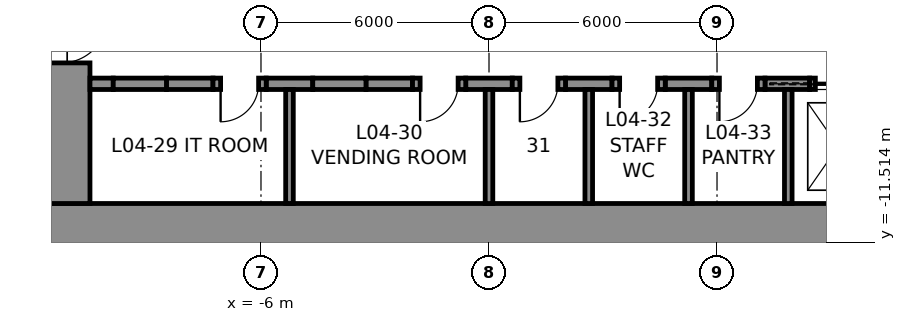
"""IFC4 building model, lengths in metres.
Left out: names, types, materials, properties, quantities, classifications, styles, units other than length and angle.
Written with IfcOpenShell. Run it as: python <this file> out.ifc"""

import sys

from ifc_helpers import new_model, si_unit, direction, frame, frame_2d, origin, place, context, subcontext, project, spatial, rectangle, extrude, element, fill, save


model = new_model("IFC4")
c1 = context("Model", 3, precision=1e-05, world=origin(), true_north=direction((0.0, 1.0)))
c2 = subcontext(c1, "Body", "Model", "MODEL_VIEW")
j1 = project(units=[si_unit("LENGTHUNIT", "METRE"), si_unit("PLANEANGLEUNIT", "RADIAN")], contexts=[c1])
p1 = place(None, origin())
s1 = spatial("IfcSite", under=j1, at=p1, CompositionType="ELEMENT")
p2 = place(p1, origin())
s2 = spatial("IfcBuilding", under=s1, at=p2, CompositionType="ELEMENT")
p3 = place(p2, frame((0.0, 0.0, 21.0)))
s3 = spatial("IfcBuildingStorey", under=s2, at=p3, CompositionType="ELEMENT", Elevation=21.0)
p4 = place(p3, frame((12.0, -11.25, 0.0), z_axis=(0.0, 0.0, 1.0), x_axis=(-1.0, 0.0, 0.0)))
e1 = element("IfcWall", 1, at=p4, inside=s3, PredefinedType="SHEAR", context=c2, shape_type="SweptSolid", body=[
    extrude(rectangle(XDim=24.0, YDim=1.5, at=frame_2d((12.0, 0.0))), origin(), (0.0, 0.0, 1.0), 5.5),
])
p5 = place(p3, frame((-11.25, -10.5, 0.0), z_axis=(0.0, 0.0, 1.0), x_axis=(0.0, 1.0, 0.0)))
e2 = element("IfcWall", 2, at=p5, inside=s3, PredefinedType="SHEAR", context=c2, shape_type="SweptSolid", body=[
    extrude(rectangle(XDim=21.0, YDim=1.5, at=frame_2d((10.5, 0.0))), origin(), (0.0, 0.0, 1.0), 5.5),
])
p6 = place(p5, frame((16.1, 0.0, 0.0)))
e3 = element("IfcOpeningElement", 3, at=p6, cuts=e2, PredefinedType="OPENING", context=c2, shape_type="SweptSolid", body=[
    extrude(rectangle(XDim=1.2, YDim=2.3, at=frame_2d((0.6, 1.15))), frame((0.0, 0.76, 0.0), z_axis=(0.0, -1.0, 0.0), x_axis=(1.0, 0.0, 0.0)), (0.0, 0.0, 1.0), 1.52),
])
p7 = place(p5, frame((3.7, 0.0, 0.0)))
e4 = element("IfcOpeningElement", 4, at=p7, cuts=e2, PredefinedType="OPENING", context=c2, shape_type="SweptSolid", body=[
    extrude(rectangle(XDim=1.2, YDim=2.3, at=frame_2d((0.6, 1.15))), frame((0.0, 0.76, 0.0), z_axis=(0.0, -1.0, 0.0), x_axis=(1.0, 0.0, 0.0)), (0.0, 0.0, 1.0), 1.52),
])
p8 = place(p3, frame((-10.5, -7.35, 0.0), z_axis=(0.0, 0.0, 1.0), x_axis=(1.0, 0.0, 0.0)))
e5 = element("IfcWall", 5, at=p8, inside=s3, PredefinedType="SHEAR", context=c2, shape_type="SweptSolid", body=[
    extrude(rectangle(XDim=0.613, YDim=0.3, at=frame_2d((0.306, 0.0))), origin(), (0.0, 0.0, 1.0), 5.5),
])
for number, where, z_axis, x_axis in (
    (6, (-8.488, -7.35, 0.0), (0.0, 0.0, 1.0), (1.0, 0.0, 0.0)),
    (7, (-5.863, -7.35, 0.0), (0.0, 0.0, 1.0), (1.0, 0.0, 0.0)),
    (8, (-3.238, -7.35, 0.0), (0.0, 0.0, 1.0), (1.0, 0.0, 0.0)),
    (9, (-0.613, -7.35, 0.0), (0.0, 0.0, 1.0), (1.0, 0.0, 0.0)),
    (10, (2.012, -7.35, 0.0), (0.0, 0.0, 1.0), (1.0, 0.0, 0.0)),
    (11, (4.637, -7.35, 0.0), (0.0, 0.0, 1.0), (1.0, 0.0, 0.0)),
):
    element("IfcWall", number, at=place(p3, frame(where, z_axis=z_axis, x_axis=x_axis)), inside=s3, PredefinedType="SHEAR", context=c2, shape_type="SweptSolid", body=[
        extrude(rectangle(XDim=1.225, YDim=0.3, at=frame_2d((0.613, 0.0))), origin(), (0.0, 0.0, 1.0), 5.5),
    ])
p9 = place(p3, frame((7.262, -7.35, 0.0), z_axis=(0.0, 0.0, 1.0), x_axis=(1.0, 0.0, 0.0)))
e12 = element("IfcWall", 12, at=p9, inside=s3, PredefinedType="SHEAR", context=c2, shape_type="SweptSolid", body=[
    extrude(rectangle(XDim=1.175, YDim=0.3, at=frame_2d((0.587, 0.0))), origin(), (0.0, 0.0, 1.0), 5.5),
])
p10 = place(p3, frame((-9.887, -7.35, 0.0), z_axis=(0.0, 0.0, 1.0), x_axis=(1.0, 0.0, 0.0)))
e13 = element("IfcWall", 13, at=p10, inside=s3, PredefinedType="PARTITIONING", context=c2, shape_type="SweptSolid", body=[
    extrude(rectangle(XDim=1.4, YDim=0.3, at=frame_2d((0.7, 0.0))), origin(), (0.0, 0.0, 1.0), 5.5),
])
p11 = place(p3, frame((-7.262, -7.35, 0.0), z_axis=(0.0, 0.0, 1.0), x_axis=(1.0, 0.0, 0.0)))
e14 = element("IfcWall", 14, at=p11, inside=s3, PredefinedType="PARTITIONING", context=c2, shape_type="SweptSolid", body=[
    extrude(rectangle(XDim=1.4, YDim=0.3, at=frame_2d((0.7, 0.0))), origin(), (0.0, 0.0, 1.0), 5.5),
])
p12 = place(p11, frame((0.2, 0.0, 0.0)))
e15 = element("IfcOpeningElement", 15, at=p12, cuts=e14, PredefinedType="OPENING", context=c2, shape_type="SweptSolid", body=[
    extrude(rectangle(XDim=1.0, YDim=2.3, at=frame_2d((0.5, 1.15))), frame((0.0, 0.16, 0.0), z_axis=(0.0, -1.0, 0.0), x_axis=(1.0, 0.0, 0.0)), (0.0, 0.0, 1.0), 0.32),
])
p13 = place(p3, frame((-4.637, -7.35, 0.0), z_axis=(0.0, 0.0, 1.0), x_axis=(1.0, 0.0, 0.0)))
e16 = element("IfcWall", 16, at=p13, inside=s3, PredefinedType="PARTITIONING", context=c2, shape_type="SweptSolid", body=[
    extrude(rectangle(XDim=1.4, YDim=0.3, at=frame_2d((0.7, 0.0))), origin(), (0.0, 0.0, 1.0), 5.5),
])
p14 = place(p3, frame((-2.012, -7.35, 0.0), z_axis=(0.0, 0.0, 1.0), x_axis=(1.0, 0.0, 0.0)))
e17 = element("IfcWall", 17, at=p14, inside=s3, PredefinedType="PARTITIONING", context=c2, shape_type="SweptSolid", body=[
    extrude(rectangle(XDim=1.4, YDim=0.3, at=frame_2d((0.7, 0.0))), origin(), (0.0, 0.0, 1.0), 5.5),
])
p15 = place(p14, frame((0.2, 0.0, 0.0)))
e18 = element("IfcOpeningElement", 18, at=p15, cuts=e17, PredefinedType="OPENING", context=c2, shape_type="SweptSolid", body=[
    extrude(rectangle(XDim=1.0, YDim=2.3, at=frame_2d((0.5, 1.15))), frame((0.0, 0.16, 0.0), z_axis=(0.0, -1.0, 0.0), x_axis=(1.0, 0.0, 0.0)), (0.0, 0.0, 1.0), 0.32),
])
p16 = place(p3, frame((0.613, -7.35, 0.0), z_axis=(0.0, 0.0, 1.0), x_axis=(1.0, 0.0, 0.0)))
e19 = element("IfcWall", 19, at=p16, inside=s3, PredefinedType="PARTITIONING", context=c2, shape_type="SweptSolid", body=[
    extrude(rectangle(XDim=1.4, YDim=0.3, at=frame_2d((0.7, 0.0))), origin(), (0.0, 0.0, 1.0), 5.5),
])
p17 = place(p16, frame((0.2, 0.0, 0.0)))
e20 = element("IfcOpeningElement", 20, at=p17, cuts=e19, PredefinedType="OPENING", context=c2, shape_type="SweptSolid", body=[
    extrude(rectangle(XDim=1.0, YDim=2.3, at=frame_2d((0.5, 1.15))), frame((0.0, 0.16, 0.0), z_axis=(0.0, -1.0, 0.0), x_axis=(1.0, 0.0, 0.0)), (0.0, 0.0, 1.0), 0.32),
])
p18 = place(p3, frame((3.238, -7.35, 0.0), z_axis=(0.0, 0.0, 1.0), x_axis=(1.0, 0.0, 0.0)))
e21 = element("IfcWall", 21, at=p18, inside=s3, PredefinedType="PARTITIONING", context=c2, shape_type="SweptSolid", body=[
    extrude(rectangle(XDim=1.4, YDim=0.3, at=frame_2d((0.7, 0.0))), origin(), (0.0, 0.0, 1.0), 5.5),
])
p19 = place(p18, frame((0.2, 0.0, 0.0)))
e22 = element("IfcOpeningElement", 22, at=p19, cuts=e21, PredefinedType="OPENING", context=c2, shape_type="SweptSolid", body=[
    extrude(rectangle(XDim=1.0, YDim=2.3, at=frame_2d((0.5, 1.15))), frame((0.0, 0.16, 0.0), z_axis=(0.0, -1.0, 0.0), x_axis=(1.0, 0.0, 0.0)), (0.0, 0.0, 1.0), 0.32),
])
p20 = place(p3, frame((5.863, -7.35, 0.0), z_axis=(0.0, 0.0, 1.0), x_axis=(1.0, 0.0, 0.0)))
e23 = element("IfcWall", 23, at=p20, inside=s3, PredefinedType="PARTITIONING", context=c2, shape_type="SweptSolid", body=[
    extrude(rectangle(XDim=1.4, YDim=0.3, at=frame_2d((0.7, 0.0))), origin(), (0.0, 0.0, 1.0), 5.5),
])
p21 = place(p20, frame((0.2, 0.0, 0.0)))
e24 = element("IfcOpeningElement", 24, at=p21, cuts=e23, PredefinedType="OPENING", context=c2, shape_type="SweptSolid", body=[
    extrude(rectangle(XDim=1.0, YDim=2.3, at=frame_2d((0.5, 1.15))), frame((0.0, 0.16, 0.0), z_axis=(0.0, -1.0, 0.0), x_axis=(1.0, 0.0, 0.0)), (0.0, 0.0, 1.0), 0.32),
])
p22 = place(p3, frame((8.438, -7.35, 0.0), z_axis=(0.0, 0.0, 1.0), x_axis=(1.0, 0.0, 0.0)))
e25 = element("IfcWall", 25, at=p22, inside=s3, PredefinedType="PARTITIONING", context=c2, shape_type="SweptSolid", body=[
    extrude(rectangle(XDim=1.5, YDim=0.3, at=frame_2d((0.75, 0.0))), origin(), (0.0, 0.0, 1.0), 5.5),
])
p23 = place(p22, frame((0.15, 0.0, 0.0)))
e26 = element("IfcOpeningElement", 26, at=p23, cuts=e25, PredefinedType="OPENING", context=c2, shape_type="SweptSolid", body=[
    extrude(rectangle(XDim=1.2, YDim=2.3, at=frame_2d((0.6, 1.15))), frame((0.0, 0.16, 0.0), z_axis=(0.0, -1.0, 0.0), x_axis=(1.0, 0.0, 0.0)), (0.0, 0.0, 1.0), 0.32),
])
for number, where, z_axis, x_axis in (
    (27, (-5.25, -10.5, 0.0), (0.0, 0.0, 1.0), (0.0, 1.0, 0.0)),
    (28, (0.0, -10.5, 0.0), (0.0, 0.0, 1.0), (0.0, 1.0, 0.0)),
    (29, (2.625, -10.5, 0.0), (0.0, 0.0, 1.0), (0.0, 1.0, 0.0)),
    (30, (5.25, -10.5, 0.0), (0.0, 0.0, 1.0), (0.0, 1.0, 0.0)),
    (31, (7.875, -10.5, 0.0), (0.0, 0.0, 1.0), (0.0, 1.0, 0.0)),
):
    element("IfcWall", number, at=place(p3, frame(where, z_axis=z_axis, x_axis=x_axis)), inside=s3, PredefinedType="PARTITIONING", context=c2, shape_type="SweptSolid", body=[
        extrude(rectangle(XDim=3.0, YDim=0.2, at=frame_2d((1.5, 0.0))), origin(), (0.0, 0.0, 1.0), 5.5),
    ])
p24 = place(p12, frame((1.0, 0.0, 0.0), z_axis=(0.0, 0.0, 1.0), x_axis=(-1.0, 0.0, 0.0)))
e32 = element("IfcDoor", 32, at=p24, inside=s3, OperationType="SINGLE_SWING_RIGHT", PredefinedType="DOOR", context=c2, shape_type="SweptSolid", body=[
    extrude(rectangle(XDim=1.0, YDim=2.3, at=frame_2d((0.5, 1.15))), frame((0.0, 0.025, 0.0), z_axis=(0.0, -1.0, 0.0), x_axis=(1.0, 0.0, 0.0)), (0.0, 0.0, 1.0), 0.05),
])
fill(e15, e32)
p25 = place(p15, frame((1.0, 0.0, 0.0), z_axis=(0.0, 0.0, 1.0), x_axis=(-1.0, 0.0, 0.0)))
e33 = element("IfcDoor", 33, at=p25, inside=s3, OperationType="SINGLE_SWING_RIGHT", PredefinedType="DOOR", context=c2, shape_type="SweptSolid", body=[
    extrude(rectangle(XDim=1.0, YDim=2.3, at=frame_2d((0.5, 1.15))), frame((0.0, 0.025, 0.0), z_axis=(0.0, -1.0, 0.0), x_axis=(1.0, 0.0, 0.0)), (0.0, 0.0, 1.0), 0.05),
])
fill(e18, e33)
p26 = place(p17, frame((1.0, 0.0, 0.0), z_axis=(0.0, 0.0, 1.0), x_axis=(-1.0, 0.0, 0.0)))
e34 = element("IfcDoor", 34, at=p26, inside=s3, OperationType="SINGLE_SWING_RIGHT", PredefinedType="DOOR", context=c2, shape_type="SweptSolid", body=[
    extrude(rectangle(XDim=1.0, YDim=2.3, at=frame_2d((0.5, 1.15))), frame((0.0, 0.025, 0.0), z_axis=(0.0, -1.0, 0.0), x_axis=(1.0, 0.0, 0.0)), (0.0, 0.0, 1.0), 0.05),
])
fill(e20, e34)
p27 = place(p19, frame((1.0, 0.0, 0.0), z_axis=(0.0, 0.0, 1.0), x_axis=(-1.0, 0.0, 0.0)))
e35 = element("IfcDoor", 35, at=p27, inside=s3, OperationType="SINGLE_SWING_RIGHT", PredefinedType="DOOR", context=c2, shape_type="SweptSolid", body=[
    extrude(rectangle(XDim=1.0, YDim=2.3, at=frame_2d((0.5, 1.15))), frame((0.0, 0.025, 0.0), z_axis=(0.0, -1.0, 0.0), x_axis=(1.0, 0.0, 0.0)), (0.0, 0.0, 1.0), 0.05),
])
fill(e22, e35)
p28 = place(p21, frame((1.0, 0.0, 0.0), z_axis=(0.0, 0.0, 1.0), x_axis=(-1.0, 0.0, 0.0)))
e36 = element("IfcDoor", 36, at=p28, inside=s3, OperationType="SINGLE_SWING_RIGHT", PredefinedType="DOOR", context=c2, shape_type="SweptSolid", body=[
    extrude(rectangle(XDim=1.0, YDim=2.3, at=frame_2d((0.5, 1.15))), frame((0.0, 0.025, 0.0), z_axis=(0.0, -1.0, 0.0), x_axis=(1.0, 0.0, 0.0)), (0.0, 0.0, 1.0), 0.05),
])
fill(e24, e36)
p29 = place(p7, frame((1.2, 0.0, 0.0), z_axis=(0.0, 0.0, 1.0), x_axis=(-1.0, 0.0, 0.0)))
e37 = element("IfcDoor", 37, at=p29, inside=s3, OperationType="SINGLE_SWING_LEFT", PredefinedType="DOOR", context=c2, shape_type="SweptSolid", body=[
    extrude(rectangle(XDim=1.2, YDim=2.3, at=frame_2d((0.6, 1.15))), frame((0.0, 0.025, 0.0), z_axis=(0.0, -1.0, 0.0), x_axis=(1.0, 0.0, 0.0)), (0.0, 0.0, 1.0), 0.05),
])
fill(e4, e37)
p30 = place(p23, origin())
e38 = element("IfcDoor", 38, at=p30, inside=s3, OperationType="SLIDING_TO_LEFT", PredefinedType="DOOR", context=c2, shape_type="SweptSolid", body=[
    extrude(rectangle(XDim=1.2, YDim=2.3, at=frame_2d((0.6, 1.15))), frame((0.0, 0.025, 0.0), z_axis=(0.0, -1.0, 0.0), x_axis=(1.0, 0.0, 0.0)), (0.0, 0.0, 1.0), 0.05),
])
fill(e26, e38)
save(model, sys.argv[1])
